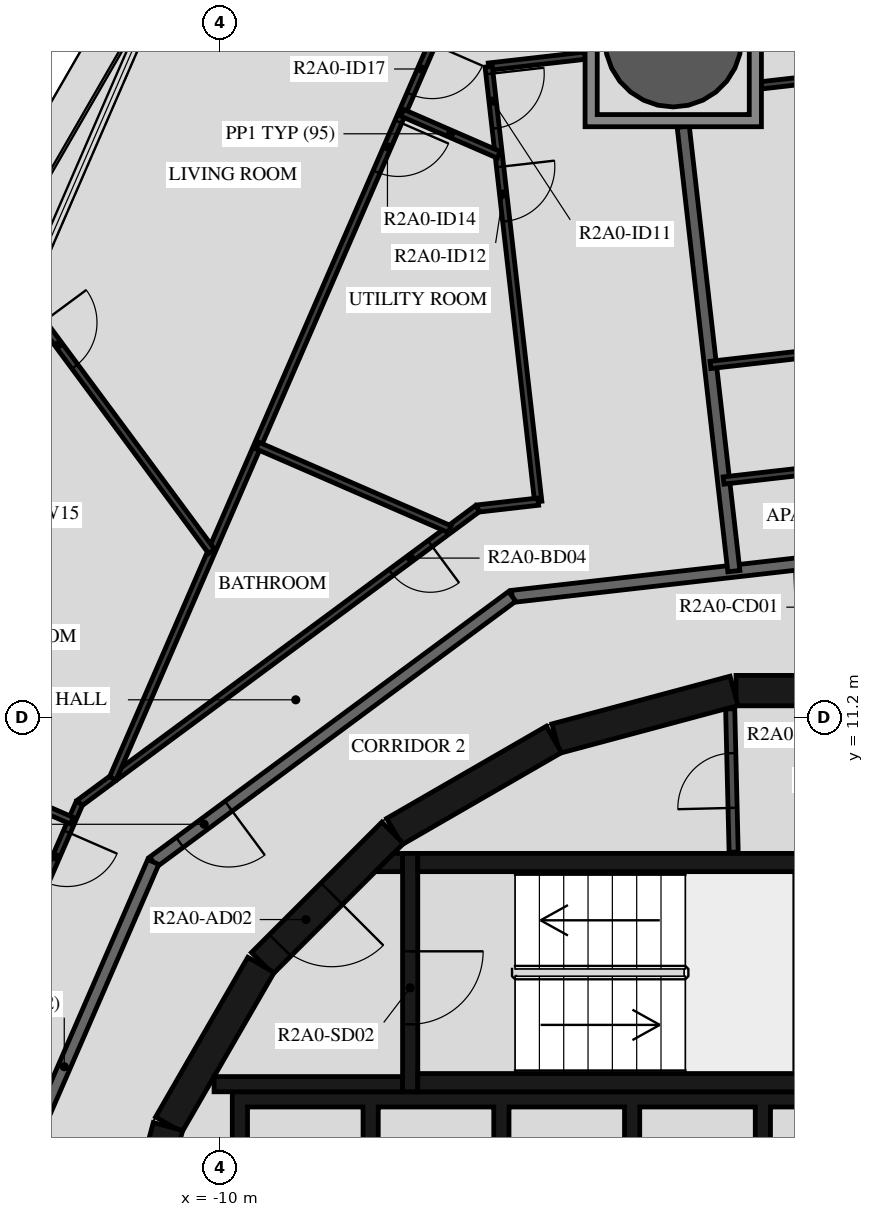
"""IFC4 building model, lengths in metres.
Left out: names, types, materials, properties, quantities, classifications, styles, units other than length and angle.
Written with IfcOpenShell. Run it as: python <this file> out.ifc"""

import sys

from ifc_helpers import new_model, si_unit, direction, frame, frame_2d, origin, origin_2d, place, context, subcontext, project, spatial, polyline, rectangle, hollow_circle, outline, extrude, element, fill, save


model = new_model("IFC4")
c1 = context("Model", 3, precision=1e-05, world=origin(), true_north=direction((0.0, 1.0)))
c2 = subcontext(c1, "Body", "Model", "MODEL_VIEW")
j1 = project(units=[si_unit("LENGTHUNIT", "METRE"), si_unit("PLANEANGLEUNIT", "RADIAN")], contexts=[c1])
p1 = place(None, origin())
s1 = spatial("IfcSite", under=j1, at=p1, CompositionType="ELEMENT")
p2 = place(p1, origin())
s2 = spatial("IfcBuilding", under=s1, at=p2, CompositionType="ELEMENT")
p3 = place(p2, frame((0.0, 0.0, 76.7)))
s3 = spatial("IfcBuildingStorey", under=s2, at=p3, CompositionType="ELEMENT", Elevation=76.7)
p4 = place(p3, frame((-2.549, 22.37, -0.45), z_axis=(0.0, 0.0, 1.0), x_axis=(1.0, 0.0, 0.0)))
e1 = element("IfcColumn", 1, at=p4, inside=s3, PredefinedType="COLUMN", context=c2, shape_type="SweptSolid", body=[
    extrude(hollow_circle(Radius=1.125, WallThickness=0.055, at=origin_2d()), origin(), (0.0, 0.0, 1.0), 3.57),
])
for number, where, z_axis, x_axis in (
    (2, (1.516, 11.647, 0.0), (0.0, 0.0, 1.0), (-1.0, 0.0, 0.0)),
    (3, (-1.55, 11.643, 0.0), (0.0, 0.0, 1.0), (-0.966, -0.259, 0.0)),
    (4, (-4.51, 10.845, 0.0), (0.0, 0.0, 1.0), (-0.866, -0.5, 0.0)),
):
    element("IfcWall", number, at=place(p3, frame(where, z_axis=z_axis, x_axis=x_axis)), inside=s3, PredefinedType="SHEAR", context=c2, shape_type="SweptSolid", body=[
        extrude(rectangle(XDim=3.033, YDim=0.5, at=frame_2d((1.516, 0.0))), origin(), (0.0, 0.0, 1.0), 3.12),
    ])
p5 = place(p3, frame((-7.164, 9.308, 0.0), z_axis=(0.0, 0.0, 1.0), x_axis=(-0.707106781187, -0.707106781187, 0.0)))
e5 = element("IfcWall", 5, at=p5, inside=s3, PredefinedType="SHEAR", context=c2, shape_type="SweptSolid", body=[
    extrude(rectangle(XDim=3.032, YDim=0.5, at=frame_2d((1.516, 0.0))), origin(), (0.0, 0.0, 1.0), 3.12),
])
p6 = place(p5, frame((1.416, 0.0, 0.0)))
e6 = element("IfcOpeningElement", 6, at=p6, cuts=e5, PredefinedType="OPENING", context=c2, shape_type="SweptSolid", body=[
    extrude(rectangle(XDim=1.2, YDim=2.1, at=frame_2d((0.6, 1.05))), frame((0.0, 0.26, 0.0), z_axis=(0.0, -1.0, 0.0), x_axis=(1.0, 0.0, 0.0)), (0.0, 0.0, 1.0), 0.52),
])
for number, where, z_axis, x_axis in (
    (7, (-9.329, 7.137, 0.0), (0.0, 0.0, 1.0), (-0.5, -0.866, 0.0)),
    (8, (-10.858, 4.479, 0.0), (0.0, 0.0, 1.0), (-0.259, -0.966, 0.0)),
):
    element("IfcWall", number, at=place(p3, frame(where, z_axis=z_axis, x_axis=x_axis)), inside=s3, PredefinedType="SHEAR", context=c2, shape_type="SweptSolid", body=[
        extrude(rectangle(XDim=3.033, YDim=0.5, at=frame_2d((1.516, 0.0))), origin(), (0.0, 0.0, 1.0), 3.12),
    ])
for number, where, z_axis, x_axis in (
    (9, (-6.75, 5.2, 0.0), (0.0, 0.0, 1.0), (1.0, 0.0, 0.0)),
    (10, (-6.75, 8.82, 0.0), (0.0, 0.0, 1.0), (1.0, 0.0, 0.0)),
):
    element("IfcWall", number, at=place(p3, frame(where, z_axis=z_axis, x_axis=x_axis)), inside=s3, PredefinedType="SHEAR", context=c2, shape_type="SweptSolid", body=[
        extrude(rectangle(XDim=6.75, YDim=0.3, at=frame_2d((3.375, 0.0))), origin(), (0.0, 0.0, 1.0), 3.12),
    ])
p7 = place(p3, frame((-6.875, 8.97, 0.0), z_axis=(0.0, 0.0, 1.0), x_axis=(0.0, -1.0, 0.0)))
e11 = element("IfcWall", 11, at=p7, inside=s3, PredefinedType="SHEAR", context=c2, shape_type="SweptSolid", body=[
    extrude(rectangle(XDim=3.92, YDim=0.25, at=frame_2d((1.96, 0.0))), origin(), (0.0, 0.0, 1.0), 3.12),
])
p8 = place(p7, frame((1.61, 0.0, 0.0)))
e12 = element("IfcOpeningElement", 12, at=p8, cuts=e11, PredefinedType="OPENING", context=c2, shape_type="SweptSolid", body=[
    extrude(rectangle(XDim=1.2, YDim=2.1, at=frame_2d((0.6, 1.05))), frame((0.0, 0.135, 0.0), z_axis=(0.0, -1.0, 0.0), x_axis=(1.0, 0.0, 0.0)), (0.0, 0.0, 1.0), 0.27),
])
p9 = place(p3, frame((-7.0, 5.175, 0.0), z_axis=(0.0, 0.0, 1.0), x_axis=(-1.0, 0.0, 0.0)))
e13 = element("IfcWall", 13, at=p9, inside=s3, PredefinedType="SHEAR", context=c2, shape_type="SweptSolid", body=[
    extrude(rectangle(XDim=3.1, YDim=0.25, at=frame_2d((1.55, 0.0))), origin(), (0.0, 0.0, 1.0), 3.12),
])
p10 = place(p3, origin())
e14 = element("IfcWall", 14, at=p10, inside=s3, PredefinedType="SHEAR", context=c2, shape_type="SweptSolid", body=[
    extrude(outline(polyline([(-7.148, 8.97), (-7.0, 8.97), (-7.0, 8.67), (-7.448, 8.67), (-7.148, 8.97)])), origin(), (0.0, 0.0, 1.0), 3.12),
])
p11 = place(p3, origin())
e15 = element("IfcWall", 15, at=p11, inside=s3, PredefinedType="SHEAR", context=c2, shape_type="SweptSolid", body=[
    extrude(outline(polyline([(-9.55, 4.8), (-7.65, 4.8), (-7.65, 1.9), (-7.4, 1.9), (-7.4, 4.8), (-5.5, 4.8), (-5.5, 1.9), (-5.25, 1.9), (-5.25, 4.8), (-3.35, 4.8), (-3.35, 1.9), (-3.1, 1.9), (-3.1, 4.8), (-1.2, 4.8), (-1.2, 1.9), (-0.95, 1.9), (-0.95, 4.8), (3.1, 4.8), (3.1, 1.9), (3.35, 1.9), (3.35, 4.8), (5.25, 4.8), (5.25, 1.9), (5.5, 1.9), (5.5, 4.8), (7.4, 4.8), (7.4, 1.9), (7.65, 1.9), (7.65, 4.8), (9.55, 4.8), (9.55, 1.9), (9.8, 1.9), (9.8, 4.8), (9.8, 5.05), (-9.8, 5.05), (-9.8, 4.8), (-9.8, 1.9), (-9.55, 1.9), (-9.55, 4.8)])), origin(), (0.0, 0.0, 1.0), 3.12),
])
p12 = place(p3, frame((-1.555, 8.99, 0.0), z_axis=(0.0, 0.0, 1.0), x_axis=(-0.024125549686, 0.999708936567, 0.0)))
e16 = element("IfcWall", 16, at=p12, inside=s3, PredefinedType="PARTITIONING", context=c2, shape_type="SweptSolid", body=[
    extrude(rectangle(XDim=2.358, YDim=0.15, at=frame_2d((1.179, 0.0))), origin(), (0.0, 0.0, 1.0), 3.12),
])
p13 = place(p12, frame((0.729, 0.0, 0.0)))
e17 = element("IfcOpeningElement", 17, at=p13, cuts=e16, PredefinedType="OPENING", context=c2, shape_type="SweptSolid", body=[
    extrude(rectangle(XDim=0.9, YDim=2.1, at=frame_2d((0.45, 1.05))), frame((0.0, 0.085, 0.0), z_axis=(0.0, -1.0, 0.0), x_axis=(1.0, 0.0, 0.0)), (0.0, 0.0, 1.0), 0.17),
])
p14 = place(p3, frame((2.096, 14.028, 0.0), z_axis=(0.0, 0.0, 1.0), x_axis=(-0.993569170114, -0.113226782163, 0.0)))
e18 = element("IfcWall", 18, at=p14, inside=s3, PredefinedType="STANDARD", context=c2, shape_type="SweptSolid", body=[
    extrude(rectangle(XDim=7.342, YDim=0.2, at=frame_2d((3.671, 0.0))), origin(), (0.0, 0.0, 1.0), 3.12),
])
p15 = place(p3, frame((-5.198, 13.196, 0.0), z_axis=(0.0, 0.0, 1.0), x_axis=(-0.803869883159, -0.594805187394, 0.0)))
e19 = element("IfcWall", 19, at=p15, inside=s3, PredefinedType="STANDARD", context=c2, shape_type="SweptSolid", body=[
    extrude(rectangle(XDim=7.342, YDim=0.2, at=frame_2d((3.671, 0.0))), origin(), (0.0, 0.0, 1.0), 3.12),
])
p16 = place(p15, frame((5.8, 0.0, 0.0)))
e20 = element("IfcOpeningElement", 20, at=p16, cuts=e19, PredefinedType="OPENING", context=c2, shape_type="SweptSolid", body=[
    extrude(rectangle(XDim=1.0, YDim=2.1, at=frame_2d((0.5, 1.05))), frame((0.0, 0.11, 0.0), z_axis=(0.0, -1.0, 0.0), x_axis=(1.0, 0.0, 0.0)), (0.0, 0.0, 1.0), 0.22),
])
p17 = place(p3, frame((-11.1, 8.829, 0.0), z_axis=(0.0, 0.0, 1.0), x_axis=(-0.398741918631, -0.917063183388, 0.0)))
e21 = element("IfcWall", 21, at=p17, inside=s3, PredefinedType="STANDARD", context=c2, shape_type="SweptSolid", body=[
    extrude(rectangle(XDim=7.342, YDim=0.2, at=frame_2d((3.671, 0.0))), origin(), (0.0, 0.0, 1.0), 3.12),
])
p18 = place(p3, frame((-2.385, 20.92, 0.0), z_axis=(0.0, 0.0, 1.0), x_axis=(0.113177776247, -0.993574753586, 0.0)))
e22 = element("IfcWall", 22, at=p18, inside=s3, PredefinedType="STANDARD", context=c2, shape_type="SweptSolid", body=[
    extrude(rectangle(XDim=7.356, YDim=0.2, at=frame_2d((3.678, 0.0))), origin(), (0.0, 0.0, 1.0), 3.12),
])
p19 = place(p3, frame((2.326, 15.563, 0.0), z_axis=(0.0, 0.0, 1.0), x_axis=(-0.993575109804, -0.113174649008, 0.0)))
e23 = element("IfcWall", 23, at=p19, inside=s3, PredefinedType="PARTITIONING", context=c2, shape_type="SweptSolid", body=[
    extrude(rectangle(XDim=4.073, YDim=0.12, at=frame_2d((2.036, 0.0))), origin(), (0.0, 0.0, 1.0), 3.12),
])
p20 = place(p3, frame((5.292, 17.827, 0.0), z_axis=(0.0, 0.0, 1.0), x_axis=(-0.993570041735, -0.113219133399, 0.0)))
e24 = element("IfcWall", 24, at=p20, inside=s3, PredefinedType="PARTITIONING", context=c2, shape_type="SweptSolid", body=[
    extrude(rectangle(XDim=7.276, YDim=0.12, at=frame_2d((3.638, 0.0))), origin(), (0.0, 0.0, 1.0), 3.12),
])
p21 = place(p3, frame((2.219, 21.979, 0.0), z_axis=(0.0, 0.0, 1.0), x_axis=(-0.99357408397, -0.113183654573, 0.0)))
e25 = element("IfcWall", 25, at=p21, inside=s3, PredefinedType="PARTITIONING", context=c2, shape_type="SweptSolid", body=[
    extrude(rectangle(XDim=3.339, YDim=0.12, at=frame_2d((1.669, 0.0))), origin(), (0.0, 0.0, 1.0), 3.12),
])
p22 = place(p21, frame((0.4, 0.0, 0.0)))
e26 = element("IfcOpeningElement", 26, at=p22, cuts=e25, PredefinedType="OPENING", context=c2, shape_type="SweptSolid", body=[
    extrude(rectangle(XDim=0.8, YDim=2.1, at=frame_2d((0.4, 1.05))), frame((0.0, 0.07, 0.0), z_axis=(0.0, -1.0, 0.0), x_axis=(1.0, 0.0, 0.0)), (0.0, 0.0, 1.0), 0.14),
])
p23 = place(p3, frame((-3.999, 22.089, 0.0), z_axis=(0.0, 0.0, 1.0), x_axis=(-0.993550908639, -0.113386912568, 0.0)))
e27 = element("IfcWall", 27, at=p23, inside=s3, PredefinedType="PARTITIONING", context=c2, shape_type="SweptSolid", body=[
    extrude(rectangle(XDim=1.595, YDim=0.12, at=frame_2d((0.798, 0.0))), origin(), (0.0, 0.0, 1.0), 3.12),
])
p24 = place(p3, frame((-5.584, 21.908, 0.0), z_axis=(0.0, 0.0, 1.0), x_axis=(0.113192725021, -0.993573050662, 0.0)))
e28 = element("IfcWall", 28, at=p24, inside=s3, PredefinedType="PARTITIONING", context=c2, shape_type="SweptSolid", body=[
    extrude(rectangle(XDim=7.2, YDim=0.12, at=frame_2d((3.6, 0.0))), origin(), (0.0, 0.0, 1.0), 3.12),
])
p25 = place(p24, frame((0.12, 0.0, 0.0)))
e29 = element("IfcOpeningElement", 29, at=p25, cuts=e28, PredefinedType="OPENING", context=c2, shape_type="SweptSolid", body=[
    extrude(rectangle(XDim=0.9, YDim=2.1, at=frame_2d((0.45, 1.05))), frame((0.0, 0.07, 0.0), z_axis=(0.0, -1.0, 0.0), x_axis=(1.0, 0.0, 0.0)), (0.0, 0.0, 1.0), 0.14),
])
p26 = place(p24, frame((1.658, 0.0, 0.0)))
e30 = element("IfcOpeningElement", 30, at=p26, cuts=e28, PredefinedType="OPENING", context=c2, shape_type="SweptSolid", body=[
    extrude(rectangle(XDim=0.9, YDim=2.1, at=frame_2d((0.45, 1.05))), frame((0.0, 0.07, 0.0), z_axis=(0.0, -1.0, 0.0), x_axis=(1.0, 0.0, 0.0)), (0.0, 0.0, 1.0), 0.14),
])
p27 = place(p3, frame((-4.769, 14.755, 0.0), z_axis=(0.0, 0.0, 1.0), x_axis=(-0.993568649539, -0.113231350131, 0.0)))
e31 = element("IfcWall", 31, at=p27, inside=s3, PredefinedType="PARTITIONING", context=c2, shape_type="SweptSolid", body=[
    extrude(rectangle(XDim=1.005, YDim=0.12, at=frame_2d((0.502, 0.0))), origin(), (0.0, 0.0, 1.0), 3.12),
])
p28 = place(p3, frame((-5.767, 14.641, 0.0), z_axis=(0.0, 0.0, 1.0), x_axis=(-0.803853364238, -0.594827511807, 0.0)))
e32 = element("IfcWall", 32, at=p28, inside=s3, PredefinedType="PARTITIONING", context=c2, shape_type="SweptSolid", body=[
    extrude(rectangle(XDim=8.146, YDim=0.12, at=frame_2d((4.073, 0.0))), origin(), (0.0, 0.0, 1.0), 3.12),
])
p29 = place(p28, frame((0.97, 0.0, 0.0)))
e33 = element("IfcOpeningElement", 33, at=p29, cuts=e32, PredefinedType="OPENING", context=c2, shape_type="SweptSolid", body=[
    extrude(rectangle(XDim=0.8, YDim=2.1, at=frame_2d((0.4, 1.05))), frame((0.0, 0.07, 0.0), z_axis=(0.0, -1.0, 0.0), x_axis=(1.0, 0.0, 0.0)), (0.0, 0.0, 1.0), 0.14),
])
p30 = place(p3, frame((-12.315, 9.796, 0.0), z_axis=(0.0, 0.0, 1.0), x_axis=(-0.398790200406, -0.917042188812, 0.0)))
e34 = element("IfcWall", 34, at=p30, inside=s3, PredefinedType="PARTITIONING", context=c2, shape_type="SweptSolid", body=[
    extrude(rectangle(XDim=2.646, YDim=0.12, at=frame_2d((1.323, 0.0))), origin(), (0.0, 0.0, 1.0), 3.12),
])
p31 = place(p30, frame((0.513, 0.0, 0.0)))
e35 = element("IfcOpeningElement", 35, at=p31, cuts=e34, PredefinedType="OPENING", context=c2, shape_type="SweptSolid", body=[
    extrude(rectangle(XDim=0.9, YDim=2.1, at=frame_2d((0.45, 1.05))), frame((0.0, 0.07, 0.0), z_axis=(0.0, -1.0, 0.0), x_axis=(1.0, 0.0, 0.0)), (0.0, 0.0, 1.0), 0.14),
])
p32 = place(p3, frame((-5.952, 23.571, 0.0), z_axis=(0.0, 0.0, 1.0), x_axis=(-0.398745097158, -0.917061801348, 0.0)))
e36 = element("IfcWall", 36, at=p32, inside=s3, PredefinedType="PARTITIONING", context=c2, shape_type="SweptSolid", body=[
    extrude(rectangle(XDim=14.576, YDim=0.12, at=frame_2d((7.288, 0.0))), origin(), (0.0, 0.0, 1.0), 3.12),
])
p33 = place(p32, frame((2.801, 0.0, 0.0)))
e37 = element("IfcOpeningElement", 37, at=p33, cuts=e36, PredefinedType="OPENING", context=c2, shape_type="SweptSolid", body=[
    extrude(rectangle(XDim=0.9, YDim=2.1, at=frame_2d((0.45, 1.05))), frame((0.0, 0.07, 0.0), z_axis=(0.0, -1.0, 0.0), x_axis=(1.0, 0.0, 0.0)), (0.0, 0.0, 1.0), 0.14),
])
p34 = place(p32, frame((1.405, 0.0, 0.0)))
e38 = element("IfcOpeningElement", 38, at=p34, cuts=e36, PredefinedType="OPENING", context=c2, shape_type="SweptSolid", body=[
    extrude(rectangle(XDim=0.9, YDim=2.1, at=frame_2d((0.45, 1.05))), frame((0.0, 0.07, 0.0), z_axis=(0.0, -1.0, 0.0), x_axis=(1.0, 0.0, 0.0)), (0.0, 0.0, 1.0), 0.14),
])
p35 = place(p3, frame((-7.005, 21.149, 0.0), z_axis=(0.0, 0.0, 1.0), x_axis=(0.917081274718, -0.398700307953, 0.0)))
e39 = element("IfcWall", 39, at=p35, inside=s3, PredefinedType="PARTITIONING", context=c2, shape_type="SweptSolid", body=[
    extrude(rectangle(XDim=1.73, YDim=0.12, at=frame_2d((0.865, 0.0))), origin(), (0.0, 0.0, 1.0), 3.12),
])
p36 = place(p3, frame((-9.385, 15.676, 0.0), z_axis=(0.0, 0.0, 1.0), x_axis=(0.917068929701, -0.398728702475, 0.0)))
e40 = element("IfcWall", 40, at=p36, inside=s3, PredefinedType="PARTITIONING", context=c2, shape_type="SweptSolid", body=[
    extrude(rectangle(XDim=3.445, YDim=0.12, at=frame_2d((1.723, 0.0))), origin(), (0.0, 0.0, 1.0), 3.12),
])
p37 = place(p3, frame((-13.163, 18.022, 0.0), z_axis=(0.0, 0.0, 1.0), x_axis=(0.594797671626, -0.803875444226, 0.0)))
e41 = element("IfcWall", 41, at=p37, inside=s3, PredefinedType="PARTITIONING", context=c2, shape_type="SweptSolid", body=[
    extrude(rectangle(XDim=5.081, YDim=0.12, at=frame_2d((2.54, 0.0))), origin(), (0.0, 0.0, 1.0), 3.12),
])
p38 = place(p37, frame((0.4, 0.0, 0.0)))
e42 = element("IfcOpeningElement", 42, at=p38, cuts=e41, PredefinedType="OPENING", context=c2, shape_type="SweptSolid", body=[
    extrude(rectangle(XDim=0.9, YDim=2.1, at=frame_2d((0.45, 1.05))), frame((0.0, 0.07, 0.0), z_axis=(0.0, -1.0, 0.0), x_axis=(1.0, 0.0, 0.0)), (0.0, 0.0, 1.0), 0.14),
])
p39 = place(p3, frame((-16.161, 11.126, 0.0), z_axis=(0.0, 0.0, 1.0), x_axis=(0.91705953326, -0.398750313425, 0.0)))
e43 = element("IfcWall", 43, at=p39, inside=s3, PredefinedType="PARTITIONING", context=c2, shape_type="SweptSolid", body=[
    extrude(rectangle(XDim=4.057, YDim=0.12, at=frame_2d((2.029, 0.0))), origin(), (0.0, 0.0, 1.0), 2.73),
])
p40 = place(p3, origin())
e44 = element("IfcWall", 44, at=p40, inside=s3, PredefinedType="STANDARD", context=c2, shape_type="SweptSolid", body=[
    extrude(outline(polyline([(-1.099, 23.82), (-1.099, 20.92), (-3.999, 20.92), (-3.999, 23.82), (-1.099, 23.82)]), holes=[polyline([(-3.799, 21.12), (-1.299, 21.12), (-1.299, 23.62), (-3.799, 23.62), (-3.799, 21.12)])]), origin(), (0.0, 0.0, 1.0), 3.12),
])
p41 = place(p8, origin())
e45 = element("IfcDoor", 45, at=p41, inside=s3, OperationType="SINGLE_SWING_LEFT", PredefinedType="DOOR", context=c2, shape_type="SweptSolid", body=[
    extrude(rectangle(XDim=1.2, YDim=2.1, at=frame_2d((0.6, 1.05))), frame((0.0, 0.025, 0.0), z_axis=(0.0, -1.0, 0.0), x_axis=(1.0, 0.0, 0.0)), (0.0, 0.0, 1.0), 0.05),
])
fill(e12, e45)
p42 = place(p6, origin())
e46 = element("IfcDoor", 46, at=p42, inside=s3, OperationType="SINGLE_SWING_RIGHT", PredefinedType="DOOR", context=c2, shape_type="SweptSolid", body=[
    extrude(rectangle(XDim=1.2, YDim=2.1, at=frame_2d((0.6, 1.05))), frame((0.0, 0.025, 0.0), z_axis=(0.0, -1.0, 0.0), x_axis=(1.0, 0.0, 0.0)), (0.0, 0.0, 1.0), 0.05),
])
fill(e6, e46)
p43 = place(p13, origin())
e47 = element("IfcDoor", 47, at=p43, inside=s3, OperationType="SINGLE_SWING_LEFT", PredefinedType="DOOR", context=c2, shape_type="SweptSolid", body=[
    extrude(rectangle(XDim=0.9, YDim=2.1, at=frame_2d((0.45, 1.05))), frame((0.0, 0.025, 0.0), z_axis=(0.0, -1.0, 0.0), x_axis=(1.0, 0.0, 0.0)), (0.0, 0.0, 1.0), 0.05),
])
fill(e17, e47)
p44 = place(p16, origin())
e48 = element("IfcDoor", 48, at=p44, inside=s3, OperationType="SINGLE_SWING_LEFT", PredefinedType="DOOR", context=c2, shape_type="SweptSolid", body=[
    extrude(rectangle(XDim=1.0, YDim=2.1, at=frame_2d((0.5, 1.05))), frame((0.0, 0.025, 0.0), z_axis=(0.0, -1.0, 0.0), x_axis=(1.0, 0.0, 0.0)), (0.0, 0.0, 1.0), 0.05),
])
fill(e20, e48)
p45 = place(p25, origin())
e49 = element("IfcDoor", 49, at=p45, inside=s3, OperationType="SINGLE_SWING_RIGHT", PredefinedType="DOOR", context=c2, shape_type="SweptSolid", body=[
    extrude(rectangle(XDim=0.9, YDim=2.1, at=frame_2d((0.45, 1.05))), frame((0.0, 0.025, 0.0), z_axis=(0.0, -1.0, 0.0), x_axis=(1.0, 0.0, 0.0)), (0.0, 0.0, 1.0), 0.05),
])
fill(e29, e49)
p46 = place(p26, origin())
e50 = element("IfcDoor", 50, at=p46, inside=s3, OperationType="SINGLE_SWING_LEFT", PredefinedType="DOOR", context=c2, shape_type="SweptSolid", body=[
    extrude(rectangle(XDim=0.9, YDim=2.1, at=frame_2d((0.45, 1.05))), frame((0.0, 0.025, 0.0), z_axis=(0.0, -1.0, 0.0), x_axis=(1.0, 0.0, 0.0)), (0.0, 0.0, 1.0), 0.05),
])
fill(e30, e50)
p47 = place(p29, origin())
e51 = element("IfcDoor", 51, at=p47, inside=s3, OperationType="SINGLE_SWING_LEFT", PredefinedType="DOOR", context=c2, shape_type="SweptSolid", body=[
    extrude(rectangle(XDim=0.8, YDim=2.1, at=frame_2d((0.4, 1.05))), frame((0.0, 0.025, 0.0), z_axis=(0.0, -1.0, 0.0), x_axis=(1.0, 0.0, 0.0)), (0.0, 0.0, 1.0), 0.05),
])
fill(e33, e51)
p48 = place(p31, origin())
e52 = element("IfcDoor", 52, at=p48, inside=s3, OperationType="SINGLE_SWING_LEFT", PredefinedType="DOOR", context=c2, shape_type="SweptSolid", body=[
    extrude(rectangle(XDim=0.9, YDim=2.1, at=frame_2d((0.45, 1.05))), frame((0.0, 0.025, 0.0), z_axis=(0.0, -1.0, 0.0), x_axis=(1.0, 0.0, 0.0)), (0.0, 0.0, 1.0), 0.05),
])
fill(e35, e52)
p49 = place(p33, origin())
e53 = element("IfcDoor", 53, at=p49, inside=s3, OperationType="SINGLE_SWING_LEFT", PredefinedType="DOOR", context=c2, shape_type="SweptSolid", body=[
    extrude(rectangle(XDim=0.9, YDim=2.1, at=frame_2d((0.45, 1.05))), frame((0.0, 0.025, 0.0), z_axis=(0.0, -1.0, 0.0), x_axis=(1.0, 0.0, 0.0)), (0.0, 0.0, 1.0), 0.05),
])
fill(e37, e53)
p50 = place(p38, origin())
e54 = element("IfcDoor", 54, at=p50, inside=s3, OperationType="SINGLE_SWING_RIGHT", PredefinedType="DOOR", context=c2, shape_type="SweptSolid", body=[
    extrude(rectangle(XDim=0.9, YDim=2.1, at=frame_2d((0.45, 1.05))), frame((0.0, 0.025, 0.0), z_axis=(0.0, -1.0, 0.0), x_axis=(1.0, 0.0, 0.0)), (0.0, 0.0, 1.0), 0.05),
])
fill(e42, e54)
p51 = place(p34, origin())
e55 = element("IfcDoor", 55, at=p51, inside=s3, OperationType="SINGLE_SWING_RIGHT", PredefinedType="DOOR", context=c2, shape_type="SweptSolid", body=[
    extrude(rectangle(XDim=0.9, YDim=2.1, at=frame_2d((0.45, 1.05))), frame((0.0, 0.025, 0.0), z_axis=(0.0, -1.0, 0.0), x_axis=(1.0, 0.0, 0.0)), (0.0, 0.0, 1.0), 0.05),
])
fill(e38, e55)
save(model, sys.argv[1])
